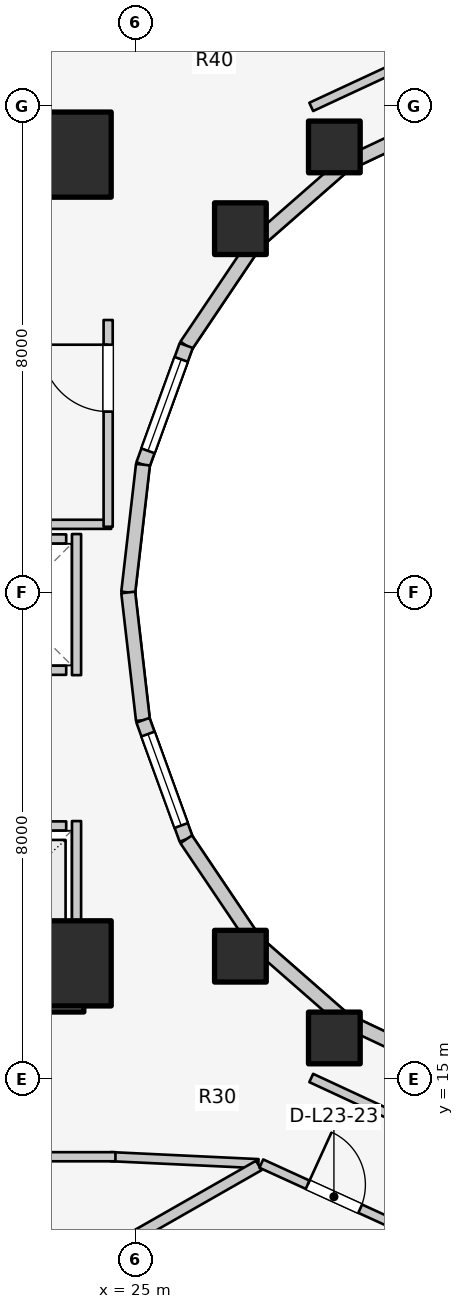
"""IFC4 building model, lengths in metres.
Left out: names, types, materials, properties, quantities, classifications, styles, units other than length and angle.
Written with IfcOpenShell. Run it as: python <this file> out.ifc"""

import sys

from ifc_helpers import new_model, si_unit, direction, frame, frame_2d, origin, origin_2d, place, context, subcontext, project, spatial, rectangle, extrude, element, fill, save


model = new_model("IFC4")
c1 = context("Model", 3, precision=1e-05, world=origin(), true_north=direction((0.0, 1.0)))
c2 = subcontext(c1, "Body", "Model", "MODEL_VIEW")
j1 = project(units=[si_unit("LENGTHUNIT", "METRE"), si_unit("PLANEANGLEUNIT", "RADIAN")], contexts=[c1])
p1 = place(None, origin())
s1 = spatial("IfcSite", under=j1, at=p1, CompositionType="ELEMENT")
p2 = place(p1, origin())
s2 = spatial("IfcBuilding", under=s1, at=p2, CompositionType="ELEMENT")
p3 = place(p2, frame((0.0, 0.0, 79.4)))
s3 = spatial("IfcBuildingStorey", under=s2, at=p3, CompositionType="ELEMENT", Elevation=79.4)
for number, where, z_axis, x_axis in (
    (1, (19.65, 16.55, 0.0), (0.0, 0.0, 1.0), (1.0, 0.0, 0.0)),
    (2, (19.65, 30.35, 0.0), (0.0, 0.0, 1.0), (1.0, 0.0, 0.0)),
):
    element("IfcWall", number, at=place(p3, frame(where, z_axis=z_axis, x_axis=x_axis)), inside=s3, PredefinedType="SHEAR", context=c2, shape_type="SweptSolid", body=[
        extrude(rectangle(XDim=4.5, YDim=0.9, at=frame_2d((2.25, 0.0))), origin(), (0.0, 0.0, 1.0), 3.1),
    ])
for number, where, z_axis, x_axis in (
    (3, (23.9, 16.9, 0.0), (0.0, 0.0, 1.0), (1.0, 0.0, 0.0)),
    (4, (23.9, 30.2, 0.0), (0.0, 0.0, 1.0), (1.0, 0.0, 0.0)),
):
    element("IfcColumn", number, at=place(p3, frame(where, z_axis=z_axis, x_axis=x_axis)), inside=s3, PredefinedType="COLUMN", context=c2, shape_type="SweptSolid", body=[
        extrude(rectangle(XDim=1.4, YDim=1.4, at=origin_2d()), origin(), (0.0, 0.0, 1.0), 3.1),
    ])
for number, where, z_axis, x_axis in (
    (5, (28.27, 30.327, 0.0), (0.0, 0.0, 1.0), (1.0, 0.0, 0.0)),
    (6, (26.725, 28.982, 0.0), (0.0, 0.0, 1.0), (1.0, 0.0, 0.0)),
    (7, (26.725, 17.018, 0.0), (0.0, 0.0, 1.0), (1.0, 0.0, 0.0)),
    (8, (28.27, 15.673, 0.0), (0.0, 0.0, 1.0), (1.0, 0.0, 0.0)),
):
    element("IfcColumn", number, at=place(p3, frame(where, z_axis=z_axis, x_axis=x_axis)), inside=s3, PredefinedType="COLUMN", context=c2, shape_type="SweptSolid", body=[
        extrude(rectangle(XDim=0.85, YDim=0.85, at=origin_2d()), origin(), (0.0, 0.0, 1.0), 3.1),
    ])
p4 = place(p3, frame((30.157, 30.843, 0.0), z_axis=(0.0, 0.0, 1.0), x_axis=(-0.904179699603, -0.427152280606, 0.0)))
e9 = element("IfcWall", 9, at=p4, inside=s3, PredefinedType="STANDARD", context=c2, shape_type="SweptSolid", body=[
    extrude(rectangle(XDim=1.899, YDim=0.23, at=frame_2d((0.95, 0.0))), origin(), (0.0, 0.0, 1.0), 2.16),
])
p5 = place(p3, frame((28.44, 30.032, 0.0), z_axis=(0.0, 0.0, 1.0), x_axis=(-0.752576694707, -0.658504607869, 0.0)))
e10 = element("IfcWall", 10, at=p5, inside=s3, PredefinedType="STANDARD", context=c2, shape_type="SweptSolid", body=[
    extrude(rectangle(XDim=1.959, YDim=0.23, at=frame_2d((0.98, 0.0))), origin(), (0.0, 0.0, 1.0), 2.16),
])
p6 = place(p3, frame((26.965, 28.742, 0.0), z_axis=(0.0, 0.0, 1.0), x_axis=(-0.558197800898, -0.829707909492, 0.0)))
e11 = element("IfcWall", 11, at=p6, inside=s3, PredefinedType="STANDARD", context=c2, shape_type="SweptSolid", body=[
    extrude(rectangle(XDim=2.027, YDim=0.23, at=frame_2d((1.013, 0.0))), origin(), (0.0, 0.0, 1.0), 2.16),
])
p7 = place(p3, frame((25.834, 27.06, 0.0), z_axis=(0.0, 0.0, 1.0), x_axis=(-0.341423187295, -0.93990968033, 0.0)))
e12 = element("IfcWall", 12, at=p7, inside=s3, PredefinedType="STANDARD", context=c2, shape_type="SweptSolid", body=[
    extrude(rectangle(XDim=2.084, YDim=0.23, at=frame_2d((1.042, 0.0))), origin(), (0.0, 0.0, 1.0), 2.84),
])
p8 = place(p7, frame((0.242, 0.0, 0.85)))
e13 = element("IfcOpeningElement", 13, at=p8, cuts=e12, PredefinedType="OPENING", context=c2, shape_type="SweptSolid", body=[
    extrude(rectangle(XDim=1.6, YDim=1.65, at=frame_2d((0.8, 0.825))), frame((0.0, 0.125, 0.0), z_axis=(0.0, -1.0, 0.0), x_axis=(1.0, 0.0, 0.0)), (0.0, 0.0, 1.0), 0.25),
])
for number, where, z_axis, x_axis in (
    (14, (25.123, 25.102, 0.0), (0.0, 0.0, 1.0), (-0.115, -0.993, 0.0)),
    (15, (24.88, 23.0, 0.0), (0.0, 0.0, 1.0), (0.115, -0.993, 0.0)),
):
    element("IfcWall", number, at=place(p3, frame(where, z_axis=z_axis, x_axis=x_axis)), inside=s3, PredefinedType="STANDARD", context=c2, shape_type="SweptSolid", body=[
        extrude(rectangle(XDim=2.115, YDim=0.23, at=frame_2d((1.058, 0.0))), origin(), (0.0, 0.0, 1.0), 2.84),
    ])
p9 = place(p3, frame((25.123, 20.898, 0.0), z_axis=(0.0, 0.0, 1.0), x_axis=(0.341423187295, -0.93990968033, 0.0)))
e16 = element("IfcWall", 16, at=p9, inside=s3, PredefinedType="STANDARD", context=c2, shape_type="SweptSolid", body=[
    extrude(rectangle(XDim=2.084, YDim=0.23, at=frame_2d((1.042, 0.0))), origin(), (0.0, 0.0, 1.0), 2.84),
])
p10 = place(p9, frame((0.242, 0.0, 0.85)))
e17 = element("IfcOpeningElement", 17, at=p10, cuts=e16, PredefinedType="OPENING", context=c2, shape_type="SweptSolid", body=[
    extrude(rectangle(XDim=1.6, YDim=1.65, at=frame_2d((0.8, 0.825))), frame((0.0, 0.125, 0.0), z_axis=(0.0, -1.0, 0.0), x_axis=(1.0, 0.0, 0.0)), (0.0, 0.0, 1.0), 0.25),
])
p11 = place(p3, frame((25.834, 18.94, 0.0), z_axis=(0.0, 0.0, 1.0), x_axis=(0.558197800898, -0.829707909492, 0.0)))
e18 = element("IfcWall", 18, at=p11, inside=s3, PredefinedType="STANDARD", context=c2, shape_type="SweptSolid", body=[
    extrude(rectangle(XDim=2.027, YDim=0.23, at=frame_2d((1.013, 0.0))), origin(), (0.0, 0.0, 1.0), 2.16),
])
p12 = place(p3, frame((26.965, 17.258, 0.0), z_axis=(0.0, 0.0, 1.0), x_axis=(0.752576694707, -0.658504607869, 0.0)))
e19 = element("IfcWall", 19, at=p12, inside=s3, PredefinedType="STANDARD", context=c2, shape_type="SweptSolid", body=[
    extrude(rectangle(XDim=1.959, YDim=0.23, at=frame_2d((0.98, 0.0))), origin(), (0.0, 0.0, 1.0), 2.16),
])
p13 = place(p3, frame((28.44, 15.968, 0.0), z_axis=(0.0, 0.0, 1.0), x_axis=(0.904179699603, -0.427152280606, 0.0)))
e20 = element("IfcWall", 20, at=p13, inside=s3, PredefinedType="STANDARD", context=c2, shape_type="SweptSolid", body=[
    extrude(rectangle(XDim=1.899, YDim=0.23, at=frame_2d((0.95, 0.0))), origin(), (0.0, 0.0, 1.0), 2.16),
])
p14 = place(p3, frame((22.04, 19.16, 0.0), z_axis=(0.0, 0.0, 1.0), x_axis=(1.0, 0.0, 0.0)))
e21 = element("IfcWall", 21, at=p14, inside=s3, PredefinedType="SOLIDWALL", context=c2, shape_type="SweptSolid", body=[
    extrude(rectangle(XDim=1.82, YDim=0.15, at=frame_2d((0.91, 0.0))), origin(), (0.0, 0.0, 1.0), 2.12),
])
p15 = place(p14, frame((0.36, 0.0, 0.0)))
e22 = element("IfcOpeningElement", 22, at=p15, cuts=e21, PredefinedType="OPENING", context=c2, shape_type="SweptSolid", body=[
    extrude(rectangle(XDim=1.1, YDim=2.1, at=frame_2d((0.55, 1.05))), frame((0.0, 0.085, 0.0), z_axis=(0.0, -1.0, 0.0), x_axis=(1.0, 0.0, 0.0)), (0.0, 0.0, 1.0), 0.17),
])
p16 = place(p3, frame((22.04, 17.1, 0.0), z_axis=(0.0, 0.0, 1.0), x_axis=(1.0, 0.0, 0.0)))
e23 = element("IfcWall", 23, at=p16, inside=s3, PredefinedType="SOLIDWALL", context=c2, shape_type="SweptSolid", body=[
    extrude(rectangle(XDim=1.82, YDim=0.15, at=frame_2d((0.91, 0.0))), origin(), (0.0, 0.0, 1.0), 2.12),
])
p17 = place(p3, frame((24.03, 17.02, 0.0), z_axis=(0.0, 0.0, 1.0), x_axis=(0.0, 1.0, 0.0)))
e24 = element("IfcWall", 24, at=p17, inside=s3, PredefinedType="SOLIDWALL", context=c2, shape_type="SweptSolid", body=[
    extrude(rectangle(XDim=2.22, YDim=0.15, at=frame_2d((1.11, 0.0))), origin(), (0.0, 0.0, 1.0), 2.12),
])
for number, where, z_axis, x_axis in (
    (25, (22.04, 21.72, 0.0), (0.0, 0.0, 1.0), (1.0, 0.0, 0.0)),
    (26, (22.04, 23.88, 0.0), (0.0, 0.0, 1.0), (1.0, 0.0, 0.0)),
):
    element("IfcWall", number, at=place(p3, frame(where, z_axis=z_axis, x_axis=x_axis)), inside=s3, PredefinedType="SOLIDWALL", context=c2, shape_type="SweptSolid", body=[
        extrude(rectangle(XDim=1.82, YDim=0.15, at=frame_2d((0.91, 0.0))), origin(), (0.0, 0.0, 1.0), 2.12),
    ])
p18 = place(p3, frame((24.03, 21.64, 0.0), z_axis=(0.0, 0.0, 1.0), x_axis=(0.0, 1.0, 0.0)))
e27 = element("IfcWall", 27, at=p18, inside=s3, PredefinedType="SOLIDWALL", context=c2, shape_type="SweptSolid", body=[
    extrude(rectangle(XDim=2.32, YDim=0.15, at=frame_2d((1.16, 0.0))), origin(), (0.0, 0.0, 1.0), 2.12),
])
p19 = place(p3, frame((19.52, 24.12, 0.0), z_axis=(0.0, 0.0, 1.0), x_axis=(1.0, 0.0, 0.0)))
e28 = element("IfcWall", 28, at=p19, inside=s3, PredefinedType="PARTITIONING", context=c2, shape_type="SweptSolid", body=[
    extrude(rectangle(XDim=5.08, YDim=0.15, at=frame_2d((2.54, 0.0))), origin(), (0.0, 0.0, 1.0), 2.12),
])
p20 = place(p3, frame((24.55, 24.08, 0.0), z_axis=(0.0, 0.0, 1.0), x_axis=(0.0, 1.0, 0.0)))
e29 = element("IfcWall", 29, at=p20, inside=s3, PredefinedType="PARTITIONING", context=c2, shape_type="SweptSolid", body=[
    extrude(rectangle(XDim=3.4, YDim=0.15, at=frame_2d((1.7, 0.0))), origin(), (0.0, 0.0, 1.0), 2.855),
])
p21 = place(p20, frame((1.894, 0.0, 0.0)))
e30 = element("IfcOpeningElement", 30, at=p21, cuts=e29, PredefinedType="OPENING", context=c2, shape_type="SweptSolid", body=[
    extrude(rectangle(XDim=1.1, YDim=2.1, at=frame_2d((0.55, 1.05))), frame((0.0, 0.085, 0.0), z_axis=(0.0, -1.0, 0.0), x_axis=(1.0, 0.0, 0.0)), (0.0, 0.0, 1.0), 0.17),
])
for number, where, z_axis, x_axis in (
    (31, (29.873, 31.906, 0.0), (0.0, 0.0, 1.0), (-0.907, -0.421, 0.0)),
    (32, (27.89, 15.015, 0.0), (0.0, 0.0, 1.0), (0.907, -0.421, 0.0)),
):
    element("IfcWall", number, at=place(p3, frame(where, z_axis=z_axis, x_axis=x_axis)), inside=s3, PredefinedType="PARTITIONING", context=c2, shape_type="SweptSolid", body=[
        extrude(rectangle(XDim=2.186, YDim=0.15, at=frame_2d((1.093, 0.0))), origin(), (0.0, 0.0, 1.0), 2.272),
    ])
p22 = place(p3, frame((27.02, 13.606, 0.0), z_axis=(0.0, 0.0, 1.0), x_axis=(-0.998877427952, 0.047369651964, 0.0)))
e33 = element("IfcWall", 33, at=p22, inside=s3, PredefinedType="PARTITIONING", context=c2, shape_type="SweptSolid", body=[
    extrude(rectangle(XDim=2.433, YDim=0.15, at=frame_2d((1.216, 0.0))), origin(), (0.0, 0.0, 1.0), 2.272),
])
p23 = place(p3, frame((17.15, 13.72, 0.0), z_axis=(0.0, 0.0, 1.0), x_axis=(1.0, 0.0, 0.0)))
e34 = element("IfcWall", 34, at=p23, inside=s3, PredefinedType="PARTITIONING", context=c2, shape_type="SweptSolid", body=[
    extrude(rectangle(XDim=7.52, YDim=0.15, at=frame_2d((3.76, 0.0))), origin(), (0.0, 0.0, 1.0), 2.272),
])
p24 = place(p23, frame((1.3, 0.0, 0.0)))
e35 = element("IfcOpeningElement", 35, at=p24, cuts=e34, PredefinedType="OPENING", context=c2, shape_type="SweptSolid", body=[
    extrude(rectangle(XDim=0.9, YDim=2.1, at=frame_2d((0.45, 1.05))), frame((0.0, 0.085, 0.0), z_axis=(0.0, -1.0, 0.0), x_axis=(1.0, 0.0, 0.0)), (0.0, 0.0, 1.0), 0.17),
])
p25 = place(p3, frame((27.027, 13.576, 0.0), z_axis=(0.0, 0.0, 1.0), x_axis=(-0.868484076301, -0.495717065685, 0.0)))
e36 = element("IfcWall", 36, at=p25, inside=s3, PredefinedType="PARTITIONING", context=c2, shape_type="SweptSolid", body=[
    extrude(rectangle(XDim=8.789, YDim=0.18, at=frame_2d((4.394, 0.0))), origin(), (0.0, 0.0, 1.0), 2.272),
])
p26 = place(p3, frame((29.411, 12.482, 0.0), z_axis=(0.0, 0.0, 1.0), x_axis=(-0.726306601605, -0.687370875485, 0.0)))
e37 = element("IfcWall", 37, at=p26, inside=s3, PredefinedType="PARTITIONING", context=c2, shape_type="SweptSolid", body=[
    extrude(rectangle(XDim=6.76, YDim=0.18, at=frame_2d((3.38, 0.0))), origin(), (0.0, 0.0, 1.0), 2.272),
])
p27 = place(p3, frame((27.069, 13.607, 0.0), z_axis=(0.0, 0.0, 1.0), x_axis=(0.909747571199, -0.415161843982, 0.0)))
e38 = element("IfcWall", 38, at=p27, inside=s3, PredefinedType="PARTITIONING", context=c2, shape_type="SweptSolid", body=[
    extrude(rectangle(XDim=2.625, YDim=0.15, at=frame_2d((1.312, 0.0))), origin(), (0.0, 0.0, 1.0), 2.272),
])
p28 = place(p27, frame((0.838, 0.0, 0.0)))
e39 = element("IfcOpeningElement", 39, at=p28, cuts=e38, PredefinedType="OPENING", context=c2, shape_type="SweptSolid", body=[
    extrude(rectangle(XDim=0.95, YDim=2.1, at=frame_2d((0.475, 1.05))), frame((0.0, 0.085, 0.0), z_axis=(0.0, -1.0, 0.0), x_axis=(1.0, 0.0, 0.0)), (0.0, 0.0, 1.0), 0.17),
])
p29 = place(p8, origin())
e40 = element("IfcWindow", 40, at=p29, inside=s3, PartitioningType="SINGLE_PANEL", PredefinedType="WINDOW", context=c2, shape_type="SweptSolid", body=[
    extrude(rectangle(XDim=1.6, YDim=1.65, at=frame_2d((0.8, 0.825))), frame((0.0, 0.03, 0.0), z_axis=(0.0, -1.0, 0.0), x_axis=(1.0, 0.0, 0.0)), (0.0, 0.0, 1.0), 0.06),
])
fill(e13, e40)
p30 = place(p10, origin())
e41 = element("IfcWindow", 41, at=p30, inside=s3, PartitioningType="SINGLE_PANEL", PredefinedType="WINDOW", context=c2, shape_type="SweptSolid", body=[
    extrude(rectangle(XDim=1.6, YDim=1.65, at=frame_2d((0.8, 0.825))), frame((0.0, 0.03, 0.0), z_axis=(0.0, -1.0, 0.0), x_axis=(1.0, 0.0, 0.0)), (0.0, 0.0, 1.0), 0.06),
])
fill(e17, e41)
p31 = place(p21, origin())
e42 = element("IfcDoor", 42, at=p31, inside=s3, OperationType="SINGLE_SWING_RIGHT", PredefinedType="DOOR", context=c2, shape_type="SweptSolid", body=[
    extrude(rectangle(XDim=1.1, YDim=2.1, at=frame_2d((0.55, 1.05))), frame((0.0, 0.025, 0.0), z_axis=(0.0, -1.0, 0.0), x_axis=(1.0, 0.0, 0.0)), (0.0, 0.0, 1.0), 0.05),
])
fill(e30, e42)
p32 = place(p28, origin())
e43 = element("IfcDoor", 43, at=p32, inside=s3, OperationType="SINGLE_SWING_LEFT", PredefinedType="DOOR", context=c2, shape_type="SweptSolid", body=[
    extrude(rectangle(XDim=0.95, YDim=2.1, at=frame_2d((0.475, 1.05))), frame((0.0, 0.025, 0.0), z_axis=(0.0, -1.0, 0.0), x_axis=(1.0, 0.0, 0.0)), (0.0, 0.0, 1.0), 0.05),
])
fill(e39, e43)
save(model, sys.argv[1])
